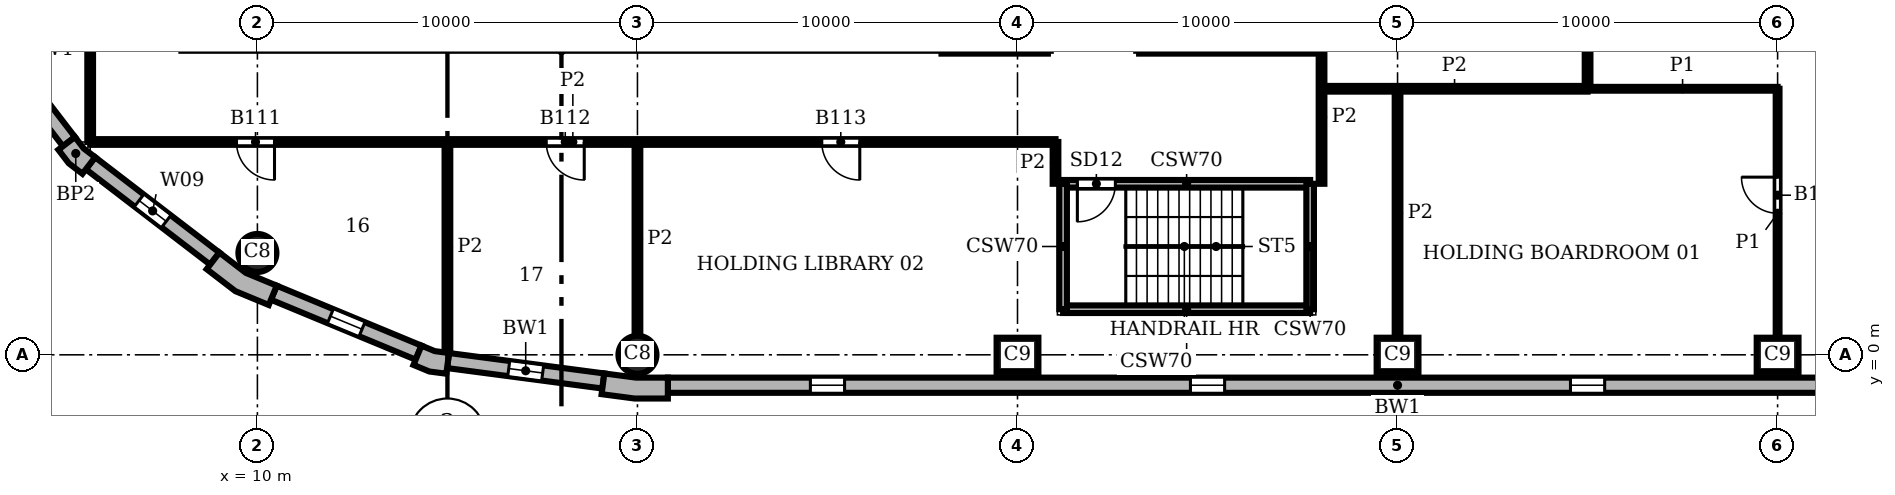
"""IFC4 building model, lengths in metres.
Left out: names, types, materials, properties, quantities, classifications, styles, units other than length and angle.
Written with IfcOpenShell. Run it as: python <this file> out.ifc"""

import sys

from ifc_helpers import new_model, si_unit, direction, frame, frame_2d, origin, origin_2d, place, context, subcontext, project, spatial, polyline, rectangle, circle, outline, extrude, element, fill, save


model = new_model("IFC4")
c1 = context("Model", 3, precision=1e-05, world=origin(), true_north=direction((0.0, 1.0)))
c2 = subcontext(c1, "Body", "Model", "MODEL_VIEW")
j1 = project(units=[si_unit("LENGTHUNIT", "METRE"), si_unit("PLANEANGLEUNIT", "RADIAN")], contexts=[c1])
p1 = place(None, origin())
s1 = spatial("IfcSite", under=j1, at=p1, CompositionType="ELEMENT")
p2 = place(p1, origin())
s2 = spatial("IfcBuilding", under=s1, at=p2, CompositionType="ELEMENT")
p3 = place(p2, frame((0.0, 0.0, 131.7)))
s3 = spatial("IfcBuildingStorey", under=s2, at=p3, CompositionType="ELEMENT", Elevation=131.7)
p4 = place(p3, frame((20.0, 0.0, 0.0), z_axis=(0.0, 0.0, 1.0), x_axis=(1.0, 0.0, 0.0)))
e1 = element("IfcColumn", 1, at=p4, inside=s3, PredefinedType="COLUMN", context=c2, shape_type="SweptSolid", body=[
    extrude(circle(Radius=0.5, at=origin_2d()), origin(), (0.0, 0.0, 1.0), 3.9),
])
for number, where, z_axis, x_axis in (
    (2, (30.0, 0.0, 0.0), (0.0, 0.0, 1.0), (1.0, 0.0, 0.0)),
    (3, (40.0, 0.0, 0.0), (0.0, 0.0, 1.0), (1.0, 0.0, 0.0)),
    (4, (50.0, 0.0, 0.0), (0.0, 0.0, 1.0), (1.0, 0.0, 0.0)),
):
    element("IfcColumn", number, at=place(p3, frame(where, z_axis=z_axis, x_axis=x_axis)), inside=s3, PredefinedType="COLUMN", context=c2, shape_type="SweptSolid", body=[
        extrude(rectangle(XDim=1.1, YDim=0.9, at=origin_2d()), origin(), (0.0, 0.0, 1.0), 3.9),
    ])
p5 = place(p3, frame((10.0, 2.679, 0.0), z_axis=(0.0, 0.0, 1.0), x_axis=(1.0, 0.0, 0.0)))
e5 = element("IfcColumn", 5, at=p5, inside=s3, PredefinedType="COLUMN", context=c2, shape_type="SweptSolid", body=[
    extrude(circle(Radius=0.5, at=origin_2d()), origin(), (0.0, 0.0, 1.0), 3.9),
])
p6 = place(p3, origin())
e6 = element("IfcWall", 6, at=p6, inside=s3, PredefinedType="SOLIDWALL", context=c2, shape_type="SweptSolid", body=[
    extrude(outline(polyline([(19.076, -0.887), (19.057, -1.036), (19.925, -1.15), (20.8, -1.15), (20.8, -1.0), (20.8, -0.6), (19.961, -0.6), (19.128, -0.49), (19.076, -0.887)])), origin(), (0.0, 0.0, 1.0), 3.9),
])
e7 = element("IfcWall", 7, at=p6, inside=s3, PredefinedType="SOLIDWALL", context=c2, shape_type="SweptSolid", body=[
    extrude(outline(polyline([(4.882, 5.487), (4.763, 5.396), (5.038, 5.038), (5.396, 4.763), (5.487, 4.882), (5.731, 5.199), (5.43, 5.43), (5.199, 5.731), (4.882, 5.487)])), origin(), (0.0, 0.0, 1.0), 3.9),
])
e8 = element("IfcWall", 8, at=p6, inside=s3, PredefinedType="SOLIDWALL", context=c2, shape_type="SweptSolid", body=[
    extrude(outline(polyline([(8.757, 2.373), (8.665, 2.254), (9.42, 1.675), (10.299, 1.311), (10.356, 1.449), (10.51, 1.819), (9.698, 2.155), (9.0, 2.69), (8.757, 2.373)])), origin(), (0.0, 0.0, 1.0), 3.9),
])
e9 = element("IfcWall", 9, at=p6, inside=s3, PredefinedType="SOLIDWALL", context=c2, shape_type="SweptSolid", body=[
    extrude(outline(polyline([(14.164, -0.128), (14.106, -0.266), (14.523, -0.439), (14.971, -0.498), (14.99, -0.349), (15.043, 0.047), (14.667, 0.097), (14.317, 0.242), (14.164, -0.128)])), origin(), (0.0, 0.0, 1.0), 3.9),
])
p7 = place(p3, frame((20.8, -0.8, 0.0), z_axis=(0.0, 0.0, 1.0), x_axis=(1.0, 0.0, 0.0)))
e10 = element("IfcWall", 10, at=p7, inside=s3, PredefinedType="SOLIDWALL", context=c2, shape_type="SweptSolid", body=[
    extrude(rectangle(XDim=38.4, YDim=0.4, at=frame_2d((19.2, 0.0))), origin(), (0.0, 0.0, 1.0), 3.9),
])
p8 = place(p7, frame((3.75, 0.0, 0.9)))
e11 = element("IfcOpeningElement", 11, at=p8, cuts=e10, PredefinedType="OPENING", context=c2, shape_type="SweptSolid", body=[
    extrude(rectangle(XDim=0.9, YDim=2.35, at=frame_2d((0.45, 1.175))), frame((0.0, 0.21, 0.0), z_axis=(0.0, -1.0, 0.0), x_axis=(1.0, 0.0, 0.0)), (0.0, 0.0, 1.0), 0.42),
])
p9 = place(p7, frame((13.75, 0.0, 0.9)))
e12 = element("IfcOpeningElement", 12, at=p9, cuts=e10, PredefinedType="OPENING", context=c2, shape_type="SweptSolid", body=[
    extrude(rectangle(XDim=0.9, YDim=2.35, at=frame_2d((0.45, 1.175))), frame((0.0, 0.21, 0.0), z_axis=(0.0, -1.0, 0.0), x_axis=(1.0, 0.0, 0.0)), (0.0, 0.0, 1.0), 0.42),
])
p10 = place(p7, frame((23.75, 0.0, 0.9)))
e13 = element("IfcOpeningElement", 13, at=p10, cuts=e10, PredefinedType="OPENING", context=c2, shape_type="SweptSolid", body=[
    extrude(rectangle(XDim=0.9, YDim=2.35, at=frame_2d((0.45, 1.175))), frame((0.0, 0.21, 0.0), z_axis=(0.0, -1.0, 0.0), x_axis=(1.0, 0.0, 0.0)), (0.0, 0.0, 1.0), 0.42),
])
p11 = place(p7, frame((33.75, 0.0, 0.9)))
e14 = element("IfcOpeningElement", 14, at=p11, cuts=e10, PredefinedType="OPENING", context=c2, shape_type="SweptSolid", body=[
    extrude(rectangle(XDim=0.9, YDim=2.35, at=frame_2d((0.45, 1.175))), frame((0.0, 0.21, 0.0), z_axis=(0.0, -1.0, 0.0), x_axis=(1.0, 0.0, 0.0)), (0.0, 0.0, 1.0), 0.42),
])
p12 = place(p3, frame((2.532, 8.878, 0.0), z_axis=(0.0, 0.0, 1.0), x_axis=(0.608759824817, -0.793354571229, 0.0)))
e15 = element("IfcWall", 15, at=p12, inside=s3, PredefinedType="SOLIDWALL", context=c2, shape_type="SweptSolid", body=[
    extrude(rectangle(XDim=4.121, YDim=0.4, at=frame_2d((2.061, 0.0))), origin(), (0.0, 0.0, 1.0), 3.9),
])
p13 = place(p12, frame((1.611, 0.0, 0.9)))
e16 = element("IfcOpeningElement", 16, at=p13, cuts=e15, PredefinedType="OPENING", context=c2, shape_type="SweptSolid", body=[
    extrude(rectangle(XDim=0.9, YDim=2.35, at=frame_2d((0.45, 1.175))), frame((0.0, 0.21, 0.0), z_axis=(0.0, -1.0, 0.0), x_axis=(1.0, 0.0, 0.0)), (0.0, 0.0, 1.0), 0.42),
])
p14 = place(p3, frame((5.609, 5.041, 0.0), z_axis=(0.0, 0.0, 1.0), x_axis=(0.793354571229, -0.608759824817, 0.0)))
e17 = element("IfcWall", 17, at=p14, inside=s3, PredefinedType="SOLIDWALL", context=c2, shape_type="SweptSolid", body=[
    extrude(rectangle(XDim=4.121, YDim=0.4, at=frame_2d((2.061, 0.0))), origin(), (0.0, 0.0, 1.0), 3.9),
])
p15 = place(p14, frame((1.611, 0.0, 0.9)))
e18 = element("IfcOpeningElement", 18, at=p15, cuts=e17, PredefinedType="OPENING", context=c2, shape_type="SweptSolid", body=[
    extrude(rectangle(XDim=0.9, YDim=2.35, at=frame_2d((0.45, 1.175))), frame((0.0, 0.21, 0.0), z_axis=(0.0, -1.0, 0.0), x_axis=(1.0, 0.0, 0.0)), (0.0, 0.0, 1.0), 0.42),
])
p16 = place(p3, frame((10.433, 1.634, 0.0), z_axis=(0.0, 0.0, 1.0), x_axis=(0.923863744394, -0.382721546029, 0.0)))
e19 = element("IfcWall", 19, at=p16, inside=s3, PredefinedType="SOLIDWALL", context=c2, shape_type="SweptSolid", body=[
    extrude(rectangle(XDim=4.121, YDim=0.4, at=frame_2d((2.061, 0.0))), origin(), (0.0, 0.0, 1.0), 3.9),
])
p17 = place(p16, frame((1.611, 0.0, 0.9)))
e20 = element("IfcOpeningElement", 20, at=p17, cuts=e19, PredefinedType="OPENING", context=c2, shape_type="SweptSolid", body=[
    extrude(rectangle(XDim=0.9, YDim=2.35, at=frame_2d((0.45, 1.175))), frame((0.0, 0.21, 0.0), z_axis=(0.0, -1.0, 0.0), x_axis=(1.0, 0.0, 0.0)), (0.0, 0.0, 1.0), 0.42),
])
p18 = place(p3, frame((15.017, -0.151, 0.0), z_axis=(0.0, 0.0, 1.0), x_axis=(0.991446429508, -0.130514280502, 0.0)))
e21 = element("IfcWall", 21, at=p18, inside=s3, PredefinedType="SOLIDWALL", context=c2, shape_type="SweptSolid", body=[
    extrude(rectangle(XDim=4.121, YDim=0.4, at=frame_2d((2.061, 0.0))), origin(), (0.0, 0.0, 1.0), 3.9),
])
p19 = place(p18, frame((1.611, 0.0, 0.9)))
e22 = element("IfcOpeningElement", 22, at=p19, cuts=e21, PredefinedType="OPENING", context=c2, shape_type="SweptSolid", body=[
    extrude(rectangle(XDim=0.9, YDim=2.35, at=frame_2d((0.45, 1.175))), frame((0.0, 0.21, 0.0), z_axis=(0.0, -1.0, 0.0), x_axis=(1.0, 0.0, 0.0)), (0.0, 0.0, 1.0), 0.42),
])
p20 = place(p3, frame((31.2, 1.2, 0.0), z_axis=(0.0, 0.0, 1.0), x_axis=(1.0, 0.0, 0.0)))
e23 = element("IfcWall", 23, at=p20, inside=s3, PredefinedType="SHEAR", context=c2, shape_type="SweptSolid", body=[
    extrude(rectangle(XDim=6.5, YDim=0.2, at=frame_2d((3.25, 0.0))), origin(), (0.0, 0.0, 1.0), 3.58),
])
p21 = place(p3, frame((31.2, 4.5, 0.0), z_axis=(0.0, 0.0, 1.0), x_axis=(1.0, 0.0, 0.0)))
e24 = element("IfcWall", 24, at=p21, inside=s3, PredefinedType="SHEAR", context=c2, shape_type="SweptSolid", body=[
    extrude(rectangle(XDim=6.5, YDim=0.2, at=frame_2d((3.25, 0.0))), origin(), (0.0, 0.0, 1.0), 3.58),
])
p22 = place(p21, frame((0.375, 0.0, 0.0)))
e25 = element("IfcOpeningElement", 25, at=p22, cuts=e24, PredefinedType="OPENING", context=c2, shape_type="SweptSolid", body=[
    extrude(rectangle(XDim=1.0, YDim=2.1, at=frame_2d((0.5, 1.05))), frame((0.0, 0.11, 0.0), z_axis=(0.0, -1.0, 0.0), x_axis=(1.0, 0.0, 0.0)), (0.0, 0.0, 1.0), 0.22),
])
for number, where, z_axis, x_axis in (
    (26, (31.2, 1.2, 0.0), (0.0, 0.0, 1.0), (0.0, 1.0, 0.0)),
    (27, (37.7, 1.2, 0.0), (0.0, 0.0, 1.0), (0.0, 1.0, 0.0)),
):
    element("IfcWall", number, at=place(p3, frame(where, z_axis=z_axis, x_axis=x_axis)), inside=s3, PredefinedType="SHEAR", context=c2, shape_type="SweptSolid", body=[
        extrude(rectangle(XDim=3.3, YDim=0.2, at=frame_2d((1.65, 0.0))), origin(), (0.0, 0.0, 1.0), 3.58),
    ])
p23 = place(p3, frame((50.0, 0.45, 0.0), z_axis=(0.0, 0.0, 1.0), x_axis=(0.0, 1.0, 0.0)))
e28 = element("IfcWall", 28, at=p23, inside=s3, PredefinedType="PARTITIONING", context=c2, shape_type="SweptSolid", body=[
    extrude(rectangle(XDim=6.55, YDim=0.1, at=frame_2d((3.275, 0.0))), origin(), (0.0, 0.0, 1.0), 3.58),
])
p24 = place(p23, frame((3.275, 0.0, 0.0)))
e29 = element("IfcOpeningElement", 29, at=p24, cuts=e28, PredefinedType="OPENING", context=c2, shape_type="SweptSolid", body=[
    extrude(rectangle(XDim=0.95, YDim=2.1, at=frame_2d((0.475, 1.05))), frame((0.0, 0.06, 0.0), z_axis=(0.0, -1.0, 0.0), x_axis=(1.0, 0.0, 0.0)), (0.0, 0.0, 1.0), 0.12),
])
p25 = place(p3, frame((45.0, 7.0, 0.0), z_axis=(0.0, 0.0, 1.0), x_axis=(1.0, 0.0, 0.0)))
e30 = element("IfcWall", 30, at=p25, inside=s3, PredefinedType="PARTITIONING", context=c2, shape_type="SweptSolid", body=[
    extrude(rectangle(XDim=5.0, YDim=0.1, at=frame_2d((2.5, 0.0))), origin(), (0.0, 0.0, 1.0), 3.58),
])
p26 = place(p3, frame((5.6, 5.6, 0.0), z_axis=(0.0, 0.0, 1.0), x_axis=(0.0, 1.0, 0.0)))
e31 = element("IfcWall", 31, at=p26, inside=s3, PredefinedType="PARTITIONING", context=c2, shape_type="SweptSolid", body=[
    extrude(rectangle(XDim=22.4, YDim=0.15, at=frame_2d((11.2, 0.0))), origin(), (0.0, 0.0, 1.0), 3.58),
])
p27 = place(p26, frame((3.85, 0.0, 0.0)))
e32 = element("IfcOpeningElement", 32, at=p27, cuts=e31, PredefinedType="OPENING", context=c2, shape_type="SweptSolid", body=[
    extrude(rectangle(XDim=1.0, YDim=2.1, at=frame_2d((0.5, 1.05))), frame((0.0, 0.085, 0.0), z_axis=(0.0, -1.0, 0.0), x_axis=(1.0, 0.0, 0.0)), (0.0, 0.0, 1.0), 0.17),
])
p28 = place(p26, frame((11.5, 0.0, 0.0)))
e33 = element("IfcOpeningElement", 33, at=p28, cuts=e31, PredefinedType="OPENING", context=c2, shape_type="SweptSolid", body=[
    extrude(rectangle(XDim=1.0, YDim=2.1, at=frame_2d((0.5, 1.05))), frame((0.0, 0.085, 0.0), z_axis=(0.0, -1.0, 0.0), x_axis=(1.0, 0.0, 0.0)), (0.0, 0.0, 1.0), 0.17),
])
p29 = place(p26, frame((16.75, 0.0, 0.0)))
e34 = element("IfcOpeningElement", 34, at=p29, cuts=e31, PredefinedType="OPENING", context=c2, shape_type="SweptSolid", body=[
    extrude(rectangle(XDim=1.8, YDim=2.1, at=frame_2d((0.9, 1.05))), frame((0.0, 0.085, 0.0), z_axis=(0.0, -1.0, 0.0), x_axis=(1.0, 0.0, 0.0)), (0.0, 0.0, 1.0), 0.17),
])
p30 = place(p3, frame((15.0, 0.063, 0.0), z_axis=(0.0, 0.0, 1.0), x_axis=(0.0, 1.0, 0.0)))
e35 = element("IfcWall", 35, at=p30, inside=s3, PredefinedType="PARTITIONING", context=c2, shape_type="SweptSolid", body=[
    extrude(rectangle(XDim=5.537, YDim=0.15, at=frame_2d((2.769, 0.0))), origin(), (0.0, 0.0, 1.0), 3.58),
])
p31 = place(p3, frame((20.0, 0.5, 0.0), z_axis=(0.0, 0.0, 1.0), x_axis=(0.0, 1.0, 0.0)))
e36 = element("IfcWall", 36, at=p31, inside=s3, PredefinedType="PARTITIONING", context=c2, shape_type="SweptSolid", body=[
    extrude(rectangle(XDim=5.1, YDim=0.15, at=frame_2d((2.55, 0.0))), origin(), (0.0, 0.0, 1.0), 3.58),
])
p32 = place(p3, frame((31.0, 4.5, 0.0), z_axis=(0.0, 0.0, 1.0), x_axis=(0.0, 1.0, 0.0)))
e37 = element("IfcWall", 37, at=p32, inside=s3, PredefinedType="PARTITIONING", context=c2, shape_type="SweptSolid", body=[
    extrude(rectangle(XDim=1.1, YDim=0.15, at=frame_2d((0.55, 0.0))), origin(), (0.0, 0.0, 1.0), 3.58),
])
p33 = place(p3, frame((38.0, 4.5, 0.0), z_axis=(0.0, 0.0, 1.0), x_axis=(0.0, 1.0, 0.0)))
e38 = element("IfcWall", 38, at=p33, inside=s3, PredefinedType="PARTITIONING", context=c2, shape_type="SweptSolid", body=[
    extrude(rectangle(XDim=3.5, YDim=0.15, at=frame_2d((1.75, 0.0))), origin(), (0.0, 0.0, 1.0), 3.58),
])
p34 = place(p3, frame((40.0, 0.45, 0.0), z_axis=(0.0, 0.0, 1.0), x_axis=(0.0, 1.0, 0.0)))
e39 = element("IfcWall", 39, at=p34, inside=s3, PredefinedType="PARTITIONING", context=c2, shape_type="SweptSolid", body=[
    extrude(rectangle(XDim=6.55, YDim=0.15, at=frame_2d((3.275, 0.0))), origin(), (0.0, 0.0, 1.0), 3.58),
])
p35 = place(p3, frame((45.0, 7.0, 0.0), z_axis=(0.0, 0.0, 1.0), x_axis=(0.0, 1.0, 0.0)))
e40 = element("IfcWall", 40, at=p35, inside=s3, PredefinedType="PARTITIONING", context=c2, shape_type="SweptSolid", body=[
    extrude(rectangle(XDim=19.0, YDim=0.15, at=frame_2d((9.5, 0.0))), origin(), (0.0, 0.0, 1.0), 3.58),
])
p36 = place(p3, frame((5.6, 5.6, 0.0), z_axis=(0.0, 0.0, 1.0), x_axis=(1.0, 0.0, 0.0)))
e41 = element("IfcWall", 41, at=p36, inside=s3, PredefinedType="PARTITIONING", context=c2, shape_type="SweptSolid", body=[
    extrude(rectangle(XDim=25.4, YDim=0.15, at=frame_2d((12.7, 0.0))), origin(), (0.0, 0.0, 1.0), 3.58),
])
p37 = place(p36, frame((3.85, 0.0, 0.0)))
e42 = element("IfcOpeningElement", 42, at=p37, cuts=e41, PredefinedType="OPENING", context=c2, shape_type="SweptSolid", body=[
    extrude(rectangle(XDim=1.0, YDim=2.1, at=frame_2d((0.5, 1.05))), frame((0.0, 0.085, 0.0), z_axis=(0.0, -1.0, 0.0), x_axis=(1.0, 0.0, 0.0)), (0.0, 0.0, 1.0), 0.17),
])
p38 = place(p36, frame((12.0, 0.0, 0.0)))
e43 = element("IfcOpeningElement", 43, at=p38, cuts=e41, PredefinedType="OPENING", context=c2, shape_type="SweptSolid", body=[
    extrude(rectangle(XDim=1.0, YDim=2.1, at=frame_2d((0.5, 1.05))), frame((0.0, 0.085, 0.0), z_axis=(0.0, -1.0, 0.0), x_axis=(1.0, 0.0, 0.0)), (0.0, 0.0, 1.0), 0.17),
])
p39 = place(p36, frame((19.25, 0.0, 0.0)))
e44 = element("IfcOpeningElement", 44, at=p39, cuts=e41, PredefinedType="OPENING", context=c2, shape_type="SweptSolid", body=[
    extrude(rectangle(XDim=1.0, YDim=2.1, at=frame_2d((0.5, 1.05))), frame((0.0, 0.085, 0.0), z_axis=(0.0, -1.0, 0.0), x_axis=(1.0, 0.0, 0.0)), (0.0, 0.0, 1.0), 0.17),
])
p40 = place(p3, frame((38.0, 7.0, 0.0), z_axis=(0.0, 0.0, 1.0), x_axis=(1.0, 0.0, 0.0)))
e45 = element("IfcWall", 45, at=p40, inside=s3, PredefinedType="PARTITIONING", context=c2, shape_type="SweptSolid", body=[
    extrude(rectangle(XDim=7.0, YDim=0.15, at=frame_2d((3.5, 0.0))), origin(), (0.0, 0.0, 1.0), 3.58),
])
p41 = place(p3, frame((28.0, 8.0, 0.0), z_axis=(0.0, 0.0, 1.0), x_axis=(1.0, 0.0, 0.0)))
e46 = element("IfcWall", 46, at=p41, inside=s3, PredefinedType="PARTITIONING", context=c2, shape_type="SweptSolid", body=[
    extrude(rectangle(XDim=2.8, YDim=0.15, at=frame_2d((1.4, 0.0))), origin(), (0.0, 0.0, 1.0), 3.58),
])
p42 = place(p3, frame((33.2, 8.0, 0.0), z_axis=(0.0, 0.0, 1.0), x_axis=(1.0, 0.0, 0.0)))
e47 = element("IfcWall", 47, at=p42, inside=s3, PredefinedType="PARTITIONING", context=c2, shape_type="SweptSolid", body=[
    extrude(rectangle(XDim=4.8, YDim=0.15, at=frame_2d((2.4, 0.0))), origin(), (0.0, 0.0, 1.0), 3.58),
])
p43 = place(p8, origin())
e48 = element("IfcWindow", 48, at=p43, inside=s3, PartitioningType="SINGLE_PANEL", PredefinedType="WINDOW", context=c2, shape_type="SweptSolid", body=[
    extrude(rectangle(XDim=0.9, YDim=2.35, at=frame_2d((0.45, 1.175))), frame((0.0, 0.16, 0.0), z_axis=(0.0, -1.0, 0.0), x_axis=(1.0, 0.0, 0.0)), (0.0, 0.0, 1.0), 0.06),
])
fill(e11, e48)
p44 = place(p9, origin())
e49 = element("IfcWindow", 49, at=p44, inside=s3, PartitioningType="SINGLE_PANEL", PredefinedType="WINDOW", context=c2, shape_type="SweptSolid", body=[
    extrude(rectangle(XDim=0.9, YDim=2.35, at=frame_2d((0.45, 1.175))), frame((0.0, 0.16, 0.0), z_axis=(0.0, -1.0, 0.0), x_axis=(1.0, 0.0, 0.0)), (0.0, 0.0, 1.0), 0.06),
])
fill(e12, e49)
p45 = place(p10, origin())
e50 = element("IfcWindow", 50, at=p45, inside=s3, PartitioningType="SINGLE_PANEL", PredefinedType="WINDOW", context=c2, shape_type="SweptSolid", body=[
    extrude(rectangle(XDim=0.9, YDim=2.35, at=frame_2d((0.45, 1.175))), frame((0.0, 0.16, 0.0), z_axis=(0.0, -1.0, 0.0), x_axis=(1.0, 0.0, 0.0)), (0.0, 0.0, 1.0), 0.06),
])
fill(e13, e50)
p46 = place(p15, origin())
e51 = element("IfcWindow", 51, at=p46, inside=s3, PartitioningType="SINGLE_PANEL", PredefinedType="WINDOW", context=c2, shape_type="SweptSolid", body=[
    extrude(rectangle(XDim=0.9, YDim=2.35, at=frame_2d((0.45, 1.175))), frame((0.0, 0.16, 0.0), z_axis=(0.0, -1.0, 0.0), x_axis=(1.0, 0.0, 0.0)), (0.0, 0.0, 1.0), 0.06),
])
fill(e18, e51)
p47 = place(p17, origin())
e52 = element("IfcWindow", 52, at=p47, inside=s3, PartitioningType="SINGLE_PANEL", PredefinedType="WINDOW", context=c2, shape_type="SweptSolid", body=[
    extrude(rectangle(XDim=0.9, YDim=2.35, at=frame_2d((0.45, 1.175))), frame((0.0, 0.16, 0.0), z_axis=(0.0, -1.0, 0.0), x_axis=(1.0, 0.0, 0.0)), (0.0, 0.0, 1.0), 0.06),
])
fill(e20, e52)
p48 = place(p19, origin())
e53 = element("IfcWindow", 53, at=p48, inside=s3, PartitioningType="SINGLE_PANEL", PredefinedType="WINDOW", context=c2, shape_type="SweptSolid", body=[
    extrude(rectangle(XDim=0.9, YDim=2.35, at=frame_2d((0.45, 1.175))), frame((0.0, 0.16, 0.0), z_axis=(0.0, -1.0, 0.0), x_axis=(1.0, 0.0, 0.0)), (0.0, 0.0, 1.0), 0.06),
])
fill(e22, e53)
p49 = place(p22, frame((1.0, 0.0, 0.0), z_axis=(0.0, 0.0, 1.0), x_axis=(-1.0, 0.0, 0.0)))
e54 = element("IfcDoor", 54, at=p49, inside=s3, OperationType="SINGLE_SWING_RIGHT", PredefinedType="DOOR", context=c2, shape_type="SweptSolid", body=[
    extrude(rectangle(XDim=1.0, YDim=2.1, at=frame_2d((0.5, 1.05))), frame((0.0, 0.025, 0.0), z_axis=(0.0, -1.0, 0.0), x_axis=(1.0, 0.0, 0.0)), (0.0, 0.0, 1.0), 0.05),
])
fill(e25, e54)
p50 = place(p37, frame((1.0, 0.0, 0.0), z_axis=(0.0, 0.0, 1.0), x_axis=(-1.0, 0.0, 0.0)))
e55 = element("IfcDoor", 55, at=p50, inside=s3, OperationType="SINGLE_SWING_LEFT", PredefinedType="DOOR", context=c2, shape_type="SweptSolid", body=[
    extrude(rectangle(XDim=1.0, YDim=2.1, at=frame_2d((0.5, 1.05))), frame((0.0, 0.025, 0.0), z_axis=(0.0, -1.0, 0.0), x_axis=(1.0, 0.0, 0.0)), (0.0, 0.0, 1.0), 0.05),
])
fill(e42, e55)
p51 = place(p38, frame((1.0, 0.0, 0.0), z_axis=(0.0, 0.0, 1.0), x_axis=(-1.0, 0.0, 0.0)))
e56 = element("IfcDoor", 56, at=p51, inside=s3, OperationType="SINGLE_SWING_LEFT", PredefinedType="DOOR", context=c2, shape_type="SweptSolid", body=[
    extrude(rectangle(XDim=1.0, YDim=2.1, at=frame_2d((0.5, 1.05))), frame((0.0, 0.025, 0.0), z_axis=(0.0, -1.0, 0.0), x_axis=(1.0, 0.0, 0.0)), (0.0, 0.0, 1.0), 0.05),
])
fill(e43, e56)
p52 = place(p39, frame((1.0, 0.0, 0.0), z_axis=(0.0, 0.0, 1.0), x_axis=(-1.0, 0.0, 0.0)))
e57 = element("IfcDoor", 57, at=p52, inside=s3, OperationType="SINGLE_SWING_LEFT", PredefinedType="DOOR", context=c2, shape_type="SweptSolid", body=[
    extrude(rectangle(XDim=1.0, YDim=2.1, at=frame_2d((0.5, 1.05))), frame((0.0, 0.025, 0.0), z_axis=(0.0, -1.0, 0.0), x_axis=(1.0, 0.0, 0.0)), (0.0, 0.0, 1.0), 0.05),
])
fill(e44, e57)
p53 = place(p24, origin())
e58 = element("IfcDoor", 58, at=p53, inside=s3, OperationType="SINGLE_SWING_RIGHT", PredefinedType="DOOR", context=c2, shape_type="SweptSolid", body=[
    extrude(rectangle(XDim=0.95, YDim=2.1, at=frame_2d((0.475, 1.05))), frame((0.0, 0.025, 0.0), z_axis=(0.0, -1.0, 0.0), x_axis=(1.0, 0.0, 0.0)), (0.0, 0.0, 1.0), 0.05),
])
fill(e29, e58)
save(model, sys.argv[1])
